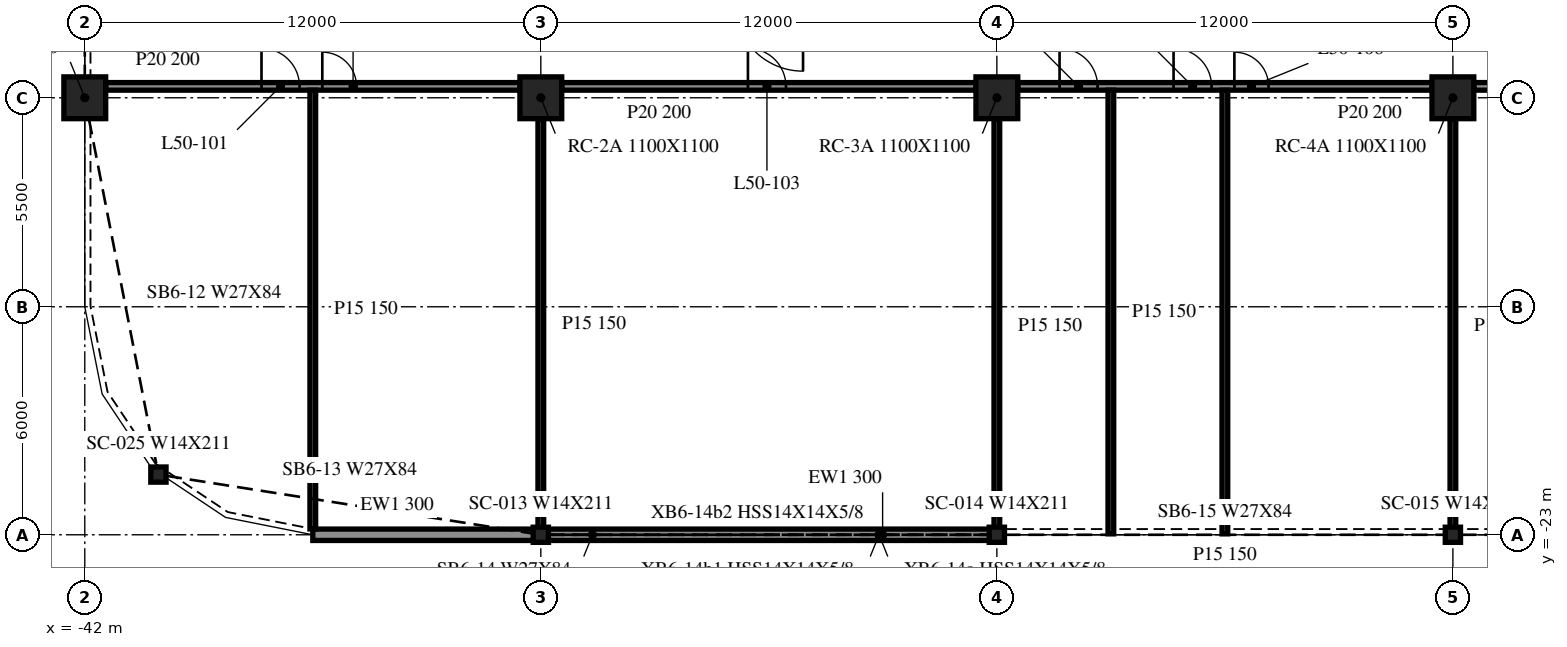
"""IFC4 building model, lengths in metres.
Left out: names, types, materials, properties, quantities, classifications, styles, units other than length and angle.
Written with IfcOpenShell. Run it as: python <this file> out.ifc"""

import sys

from ifc_helpers import new_model, si_unit, direction, frame, frame_2d, origin, origin_2d, place, context, subcontext, project, spatial, rectangle, i_section, extrude, element, fill, save


model = new_model("IFC4")
c1 = context("Model", 3, precision=1e-05, world=origin(), true_north=direction((0.0, 1.0)))
c2 = subcontext(c1, "Body", "Model", "MODEL_VIEW")
j1 = project(units=[si_unit("LENGTHUNIT", "METRE"), si_unit("PLANEANGLEUNIT", "RADIAN")], contexts=[c1])
p1 = place(None, origin())
s1 = spatial("IfcSite", under=j1, at=p1, CompositionType="ELEMENT")
p2 = place(p1, origin())
s2 = spatial("IfcBuilding", under=s1, at=p2, CompositionType="ELEMENT")
p3 = place(p2, frame((0.0, 0.0, 209.1)))
s3 = spatial("IfcBuildingStorey", under=s2, at=p3, CompositionType="ELEMENT", Elevation=209.1)
for number, where, z_axis, x_axis in (
    (1, (-42.0, -11.5, -0.34), (0.0, 0.0, 1.0), (1.0, 0.0, 0.0)),
    (2, (-30.0, -11.5, -0.34), (0.0, 0.0, 1.0), (1.0, 0.0, 0.0)),
    (3, (-18.0, -11.5, -0.34), (0.0, 0.0, 1.0), (1.0, 0.0, 0.0)),
    (4, (-6.0, -11.5, -0.34), (0.0, 0.0, 1.0), (1.0, 0.0, 0.0)),
):
    element("IfcColumn", number, at=place(p3, frame(where, z_axis=z_axis, x_axis=x_axis)), inside=s3, PredefinedType="COLUMN", context=c2, shape_type="SweptSolid", body=[
        extrude(rectangle(XDim=1.1, YDim=1.1, at=origin_2d()), origin(), (0.0, 0.0, 1.0), 3.8),
    ])
for number, where, z_axis, x_axis in (
    (5, (-40.062, -21.416, -0.34), (0.0, 0.0, 1.0), (1.0, 0.0, 0.0)),
    (6, (-30.0, -23.0, -0.34), (0.0, 0.0, 1.0), (1.0, 0.0, 0.0)),
    (7, (-18.0, -23.0, -0.34), (0.0, 0.0, 1.0), (1.0, 0.0, 0.0)),
    (8, (-6.0, -23.0, -0.34), (0.0, 0.0, 1.0), (1.0, 0.0, 0.0)),
):
    element("IfcColumn", number, at=place(p3, frame(where, z_axis=z_axis, x_axis=x_axis)), inside=s3, PredefinedType="COLUMN", context=c2, shape_type="SweptSolid", body=[
        extrude(i_section(OverallWidth=0.401, OverallDepth=0.399, WebThickness=0.025, FlangeThickness=0.04, at=origin_2d()), origin(), (0.0, 0.0, 1.0), 3.8),
    ])
p4 = place(p3, frame((-36.0, -23.0, 0.0), z_axis=(0.0, 0.0, 1.0), x_axis=(1.0, 0.0, 0.0)))
e9 = element("IfcWall", 9, at=p4, inside=s3, PredefinedType="NOTDEFINED", context=c2, shape_type="SweptSolid", body=[
    extrude(rectangle(XDim=5.988, YDim=0.3, at=frame_2d((2.994, 0.0))), origin(), (0.0, 0.0, 1.0), 2.782),
])
p5 = place(p3, frame((-29.988, -23.0, 0.0), z_axis=(0.0, 0.0, 1.0), x_axis=(1.0, 0.0, 0.0)))
e10 = element("IfcWall", 10, at=p5, inside=s3, PredefinedType="NOTDEFINED", context=c2, shape_type="SweptSolid", body=[
    extrude(rectangle(XDim=11.975, YDim=0.3, at=frame_2d((5.988, 0.0))), origin(), (0.0, 0.0, 1.0), 2.782),
])
p6 = place(p3, frame((-41.45, -11.2, 0.0), z_axis=(0.0, 0.0, 1.0), x_axis=(1.0, 0.0, 0.0)))
e11 = element("IfcWall", 11, at=p6, inside=s3, PredefinedType="PARTITIONING", context=c2, shape_type="SweptSolid", body=[
    extrude(rectangle(XDim=10.9, YDim=0.2, at=frame_2d((5.45, 0.0))), origin(), (0.0, 0.0, 1.0), 3.46),
])
p7 = place(p6, frame((4.1, 0.0, 0.0)))
e12 = element("IfcOpeningElement", 12, at=p7, cuts=e11, PredefinedType="OPENING", context=c2, shape_type="SweptSolid", body=[
    extrude(rectangle(XDim=1.0, YDim=2.1, at=frame_2d((0.5, 1.05))), frame((0.0, 0.11, 0.0), z_axis=(0.0, -1.0, 0.0), x_axis=(1.0, 0.0, 0.0)), (0.0, 0.0, 1.0), 0.22),
])
p8 = place(p6, frame((5.7, 0.0, 0.0)))
e13 = element("IfcOpeningElement", 13, at=p8, cuts=e11, PredefinedType="OPENING", context=c2, shape_type="SweptSolid", body=[
    extrude(rectangle(XDim=0.9, YDim=2.1, at=frame_2d((0.45, 1.05))), frame((0.0, 0.11, 0.0), z_axis=(0.0, -1.0, 0.0), x_axis=(1.0, 0.0, 0.0)), (0.0, 0.0, 1.0), 0.22),
])
p9 = place(p3, frame((-29.45, -11.2, 0.0), z_axis=(0.0, 0.0, 1.0), x_axis=(1.0, 0.0, 0.0)))
e14 = element("IfcWall", 14, at=p9, inside=s3, PredefinedType="PARTITIONING", context=c2, shape_type="SweptSolid", body=[
    extrude(rectangle(XDim=10.9, YDim=0.2, at=frame_2d((5.45, 0.0))), origin(), (0.0, 0.0, 1.0), 3.46),
])
p10 = place(p9, frame((4.9, 0.0, 0.0)))
e15 = element("IfcOpeningElement", 15, at=p10, cuts=e14, PredefinedType="OPENING", context=c2, shape_type="SweptSolid", body=[
    extrude(rectangle(XDim=1.0, YDim=2.1, at=frame_2d((0.5, 1.05))), frame((0.0, 0.11, 0.0), z_axis=(0.0, -1.0, 0.0), x_axis=(1.0, 0.0, 0.0)), (0.0, 0.0, 1.0), 0.22),
])
p11 = place(p3, frame((-17.45, -11.2, 0.0), z_axis=(0.0, 0.0, 1.0), x_axis=(1.0, 0.0, 0.0)))
e16 = element("IfcWall", 16, at=p11, inside=s3, PredefinedType="PARTITIONING", context=c2, shape_type="SweptSolid", body=[
    extrude(rectangle(XDim=10.9, YDim=0.2, at=frame_2d((5.45, 0.0))), origin(), (0.0, 0.0, 1.0), 3.46),
])
p12 = place(p11, frame((1.1, 0.0, 0.0)))
e17 = element("IfcOpeningElement", 17, at=p12, cuts=e16, PredefinedType="OPENING", context=c2, shape_type="SweptSolid", body=[
    extrude(rectangle(XDim=1.0, YDim=2.1, at=frame_2d((0.5, 1.05))), frame((0.0, 0.11, 0.0), z_axis=(0.0, -1.0, 0.0), x_axis=(1.0, 0.0, 0.0)), (0.0, 0.0, 1.0), 0.22),
])
p13 = place(p11, frame((4.1, 0.0, 0.0)))
e18 = element("IfcOpeningElement", 18, at=p13, cuts=e16, PredefinedType="OPENING", context=c2, shape_type="SweptSolid", body=[
    extrude(rectangle(XDim=1.0, YDim=2.1, at=frame_2d((0.5, 1.05))), frame((0.0, 0.11, 0.0), z_axis=(0.0, -1.0, 0.0), x_axis=(1.0, 0.0, 0.0)), (0.0, 0.0, 1.0), 0.22),
])
p14 = place(p11, frame((5.7, 0.0, 0.0)))
e19 = element("IfcOpeningElement", 19, at=p14, cuts=e16, PredefinedType="OPENING", context=c2, shape_type="SweptSolid", body=[
    extrude(rectangle(XDim=0.9, YDim=2.1, at=frame_2d((0.45, 1.05))), frame((0.0, 0.11, 0.0), z_axis=(0.0, -1.0, 0.0), x_axis=(1.0, 0.0, 0.0)), (0.0, 0.0, 1.0), 0.22),
])
p15 = place(p3, frame((-5.45, -11.2, 0.0), z_axis=(0.0, 0.0, 1.0), x_axis=(1.0, 0.0, 0.0)))
e20 = element("IfcWall", 20, at=p15, inside=s3, PredefinedType="PARTITIONING", context=c2, shape_type="SweptSolid", body=[
    extrude(rectangle(XDim=10.9, YDim=0.2, at=frame_2d((5.45, 0.0))), origin(), (0.0, 0.0, 1.0), 3.46),
])
p16 = place(p15, frame((4.9, 0.0, 0.0)))
e21 = element("IfcOpeningElement", 21, at=p16, cuts=e20, PredefinedType="OPENING", context=c2, shape_type="SweptSolid", body=[
    extrude(rectangle(XDim=1.0, YDim=2.1, at=frame_2d((0.5, 1.05))), frame((0.0, 0.11, 0.0), z_axis=(0.0, -1.0, 0.0), x_axis=(1.0, 0.0, 0.0)), (0.0, 0.0, 1.0), 0.22),
])
p17 = place(p3, frame((-36.0, -22.847, 0.0), z_axis=(0.0, 0.0, 1.0), x_axis=(0.0, 1.0, 0.0)))
e22 = element("IfcWall", 22, at=p17, inside=s3, PredefinedType="PARTITIONING", context=c2, shape_type="SweptSolid", body=[
    extrude(rectangle(XDim=11.547, YDim=0.15, at=frame_2d((5.773, 0.0))), origin(), (0.0, 0.0, 1.0), 3.46),
])
p18 = place(p3, frame((-30.0, -22.85, 0.0), z_axis=(0.0, 0.0, 1.0), x_axis=(0.0, 1.0, 0.0)))
e23 = element("IfcWall", 23, at=p18, inside=s3, PredefinedType="PARTITIONING", context=c2, shape_type="SweptSolid", body=[
    extrude(rectangle(XDim=10.8, YDim=0.15, at=frame_2d((5.4, 0.0))), origin(), (0.0, 0.0, 1.0), 3.46),
])
p19 = place(p3, frame((-18.0, -22.975, 0.0), z_axis=(0.0, 0.0, 1.0), x_axis=(0.0, 1.0, 0.0)))
e24 = element("IfcWall", 24, at=p19, inside=s3, PredefinedType="PARTITIONING", context=c2, shape_type="SweptSolid", body=[
    extrude(rectangle(XDim=10.925, YDim=0.15, at=frame_2d((5.462, 0.0))), origin(), (0.0, 0.0, 1.0), 3.46),
])
for number, where, z_axis, x_axis in (
    (25, (-15.0, -22.975, 0.0), (0.0, 0.0, 1.0), (0.0, 1.0, 0.0)),
    (26, (-12.0, -22.975, 0.0), (0.0, 0.0, 1.0), (0.0, 1.0, 0.0)),
):
    element("IfcWall", number, at=place(p3, frame(where, z_axis=z_axis, x_axis=x_axis)), inside=s3, PredefinedType="PARTITIONING", context=c2, shape_type="SweptSolid", body=[
        extrude(rectangle(XDim=11.675, YDim=0.15, at=frame_2d((5.837, 0.0))), origin(), (0.0, 0.0, 1.0), 3.46),
    ])
p20 = place(p3, frame((-6.0, -22.975, 0.0), z_axis=(0.0, 0.0, 1.0), x_axis=(0.0, 1.0, 0.0)))
e27 = element("IfcWall", 27, at=p20, inside=s3, PredefinedType="PARTITIONING", context=c2, shape_type="SweptSolid", body=[
    extrude(rectangle(XDim=10.925, YDim=0.15, at=frame_2d((5.462, 0.0))), origin(), (0.0, 0.0, 1.0), 3.46),
])
p21 = place(p7, origin())
e28 = element("IfcDoor", 28, at=p21, inside=s3, OperationType="SINGLE_SWING_RIGHT", PredefinedType="DOOR", context=c2, shape_type="SweptSolid", body=[
    extrude(rectangle(XDim=1.0, YDim=2.1, at=frame_2d((0.5, 1.05))), frame((0.0, 0.025, 0.0), z_axis=(0.0, -1.0, 0.0), x_axis=(1.0, 0.0, 0.0)), (0.0, 0.0, 1.0), 0.05),
])
fill(e12, e28)
p22 = place(p8, origin())
e29 = element("IfcDoor", 29, at=p22, inside=s3, OperationType="SINGLE_SWING_LEFT", PredefinedType="DOOR", context=c2, shape_type="SweptSolid", body=[
    extrude(rectangle(XDim=0.9, YDim=2.1, at=frame_2d((0.45, 1.05))), frame((0.0, 0.025, 0.0), z_axis=(0.0, -1.0, 0.0), x_axis=(1.0, 0.0, 0.0)), (0.0, 0.0, 1.0), 0.05),
])
fill(e13, e29)
p23 = place(p10, origin())
e30 = element("IfcDoor", 30, at=p23, inside=s3, OperationType="SINGLE_SWING_RIGHT", PredefinedType="DOOR", context=c2, shape_type="SweptSolid", body=[
    extrude(rectangle(XDim=1.0, YDim=2.1, at=frame_2d((0.5, 1.05))), frame((0.0, 0.025, 0.0), z_axis=(0.0, -1.0, 0.0), x_axis=(1.0, 0.0, 0.0)), (0.0, 0.0, 1.0), 0.05),
])
fill(e15, e30)
p24 = place(p12, origin())
e31 = element("IfcDoor", 31, at=p24, inside=s3, OperationType="SINGLE_SWING_RIGHT", PredefinedType="DOOR", context=c2, shape_type="SweptSolid", body=[
    extrude(rectangle(XDim=1.0, YDim=2.1, at=frame_2d((0.5, 1.05))), frame((0.0, 0.025, 0.0), z_axis=(0.0, -1.0, 0.0), x_axis=(1.0, 0.0, 0.0)), (0.0, 0.0, 1.0), 0.05),
])
fill(e17, e31)
p25 = place(p13, origin())
e32 = element("IfcDoor", 32, at=p25, inside=s3, OperationType="SINGLE_SWING_RIGHT", PredefinedType="DOOR", context=c2, shape_type="SweptSolid", body=[
    extrude(rectangle(XDim=1.0, YDim=2.1, at=frame_2d((0.5, 1.05))), frame((0.0, 0.025, 0.0), z_axis=(0.0, -1.0, 0.0), x_axis=(1.0, 0.0, 0.0)), (0.0, 0.0, 1.0), 0.05),
])
fill(e18, e32)
p26 = place(p14, origin())
e33 = element("IfcDoor", 33, at=p26, inside=s3, OperationType="SINGLE_SWING_LEFT", PredefinedType="DOOR", context=c2, shape_type="SweptSolid", body=[
    extrude(rectangle(XDim=0.9, YDim=2.1, at=frame_2d((0.45, 1.05))), frame((0.0, 0.025, 0.0), z_axis=(0.0, -1.0, 0.0), x_axis=(1.0, 0.0, 0.0)), (0.0, 0.0, 1.0), 0.05),
])
fill(e19, e33)
save(model, sys.argv[1])
